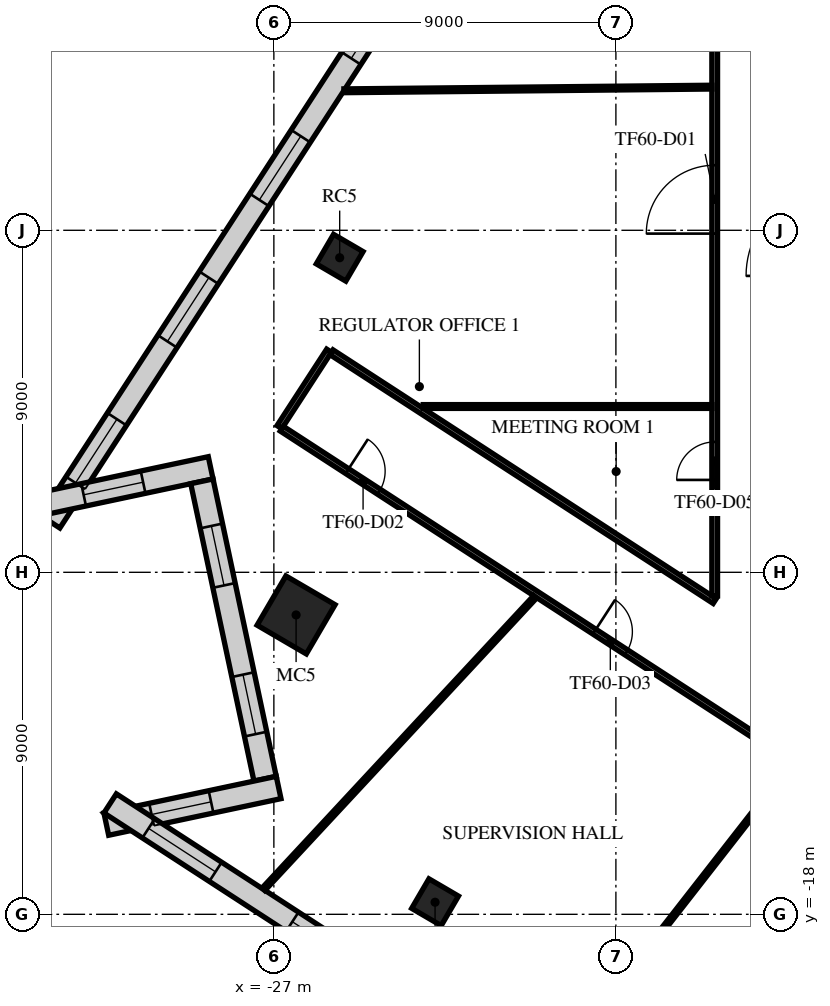
"""IFC4 building model, lengths in metres.
Left out: names, types, materials, properties, quantities, classifications, styles, units other than length and angle.
Written with IfcOpenShell. Run it as: python <this file> out.ifc"""

import sys

from ifc_helpers import new_model, si_unit, direction, frame, frame_2d, origin, origin_2d, place, context, subcontext, project, spatial, rectangle, extrude, element, fill, save


model = new_model("IFC4")
c1 = context("Model", 3, precision=1e-05, world=origin(), true_north=direction((0.0, 1.0)))
c2 = subcontext(c1, "Body", "Model", "MODEL_VIEW")
j1 = project(units=[si_unit("LENGTHUNIT", "METRE"), si_unit("PLANEANGLEUNIT", "RADIAN")], contexts=[c1])
p1 = place(None, origin())
s1 = spatial("IfcSite", under=j1, at=p1, CompositionType="ELEMENT")
p2 = place(p1, origin())
s2 = spatial("IfcBuilding", under=s1, at=p2, CompositionType="ELEMENT")
p3 = place(p2, frame((0.0, 0.0, 254.9)))
s3 = spatial("IfcBuildingStorey", under=s2, at=p3, CompositionType="ELEMENT", Elevation=254.9)
p4 = place(p3, frame((-25.268, -0.722, 0.0), z_axis=(0.0, 0.0, 1.0), x_axis=(0.504643651291, 0.863327739165, 0.0)))
e1 = element("IfcColumn", 1, at=p4, inside=s3, PredefinedType="COLUMN", context=c2, shape_type="SweptSolid", body=[
    extrude(rectangle(XDim=0.9, YDim=0.9, at=origin_2d()), origin(), (0.0, 0.0, 1.0), 4.0),
])
p5 = place(p3, frame((-26.415, -10.122, 0.0), z_axis=(0.0, 0.0, 1.0), x_axis=(0.504643651291, 0.863327739165, 0.0)))
e2 = element("IfcColumn", 2, at=p5, inside=s3, PredefinedType="COLUMN", context=c2, shape_type="SweptSolid", body=[
    extrude(rectangle(XDim=1.5, YDim=1.5, at=origin_2d()), origin(), (0.0, 0.0, 1.0), 4.0),
])
p6 = place(p3, frame((-22.758, -17.682, 0.0), z_axis=(0.0, 0.0, 1.0), x_axis=(0.504643651291, 0.863327739165, 0.0)))
e3 = element("IfcColumn", 3, at=p6, inside=s3, PredefinedType="COLUMN", context=c2, shape_type="SweptSolid", body=[
    extrude(rectangle(XDim=0.9, YDim=0.9, at=origin_2d()), origin(), (0.0, 0.0, 1.0), 4.0),
])
p7 = place(p3, frame((-6.281, 33.292, 0.0), z_axis=(0.0, 0.0, 1.0), x_axis=(-0.544637268583, -0.838671715077, 0.0)))
e4 = element("IfcWall", 4, at=p7, inside=s3, PredefinedType="STANDARD", context=c2, shape_type="SweptSolid", body=[
    extrude(rectangle(XDim=48.843, YDim=0.6, at=frame_2d((24.422, 0.0))), origin(), (0.0, 0.0, 1.0), 3.64),
])
p8 = place(p7, frame((1.22, 0.0, 0.9)))
e5 = element("IfcOpeningElement", 5, at=p8, cuts=e4, PredefinedType="OPENING", context=c2, shape_type="SweptSolid", body=[
    extrude(rectangle(XDim=2.0, YDim=2.1, at=frame_2d((1.0, 1.05))), frame((0.0, 0.31, 0.0), z_axis=(0.0, -1.0, 0.0), x_axis=(1.0, 0.0, 0.0)), (0.0, 0.0, 1.0), 0.62),
])
p9 = place(p7, frame((5.66, 0.0, 0.9)))
e6 = element("IfcOpeningElement", 6, at=p9, cuts=e4, PredefinedType="OPENING", context=c2, shape_type="SweptSolid", body=[
    extrude(rectangle(XDim=2.0, YDim=2.1, at=frame_2d((1.0, 1.05))), frame((0.0, 0.31, 0.0), z_axis=(0.0, -1.0, 0.0), x_axis=(1.0, 0.0, 0.0)), (0.0, 0.0, 1.0), 0.62),
])
p10 = place(p7, frame((14.541, 0.0, 0.9)))
e7 = element("IfcOpeningElement", 7, at=p10, cuts=e4, PredefinedType="OPENING", context=c2, shape_type="SweptSolid", body=[
    extrude(rectangle(XDim=2.0, YDim=2.1, at=frame_2d((1.0, 1.05))), frame((0.0, 0.31, 0.0), z_axis=(0.0, -1.0, 0.0), x_axis=(1.0, 0.0, 0.0)), (0.0, 0.0, 1.0), 0.62),
])
p11 = place(p7, frame((18.981, 0.0, 0.9)))
e8 = element("IfcOpeningElement", 8, at=p11, cuts=e4, PredefinedType="OPENING", context=c2, shape_type="SweptSolid", body=[
    extrude(rectangle(XDim=2.0, YDim=2.1, at=frame_2d((1.0, 1.05))), frame((0.0, 0.31, 0.0), z_axis=(0.0, -1.0, 0.0), x_axis=(1.0, 0.0, 0.0)), (0.0, 0.0, 1.0), 0.62),
])
p12 = place(p7, frame((23.422, 0.0, 0.9)))
e9 = element("IfcOpeningElement", 9, at=p12, cuts=e4, PredefinedType="OPENING", context=c2, shape_type="SweptSolid", body=[
    extrude(rectangle(XDim=2.0, YDim=2.1, at=frame_2d((1.0, 1.05))), frame((0.0, 0.31, 0.0), z_axis=(0.0, -1.0, 0.0), x_axis=(1.0, 0.0, 0.0)), (0.0, 0.0, 1.0), 0.62),
])
p13 = place(p7, frame((27.862, 0.0, 0.9)))
e10 = element("IfcOpeningElement", 10, at=p13, cuts=e4, PredefinedType="OPENING", context=c2, shape_type="SweptSolid", body=[
    extrude(rectangle(XDim=2.0, YDim=2.1, at=frame_2d((1.0, 1.05))), frame((0.0, 0.31, 0.0), z_axis=(0.0, -1.0, 0.0), x_axis=(1.0, 0.0, 0.0)), (0.0, 0.0, 1.0), 0.62),
])
p14 = place(p7, frame((32.302, 0.0, 0.9)))
e11 = element("IfcOpeningElement", 11, at=p14, cuts=e4, PredefinedType="OPENING", context=c2, shape_type="SweptSolid", body=[
    extrude(rectangle(XDim=2.0, YDim=2.1, at=frame_2d((1.0, 1.05))), frame((0.0, 0.31, 0.0), z_axis=(0.0, -1.0, 0.0), x_axis=(1.0, 0.0, 0.0)), (0.0, 0.0, 1.0), 0.62),
])
p15 = place(p7, frame((36.742, 0.0, 0.9)))
e12 = element("IfcOpeningElement", 12, at=p15, cuts=e4, PredefinedType="OPENING", context=c2, shape_type="SweptSolid", body=[
    extrude(rectangle(XDim=2.0, YDim=2.1, at=frame_2d((1.0, 1.05))), frame((0.0, 0.31, 0.0), z_axis=(0.0, -1.0, 0.0), x_axis=(1.0, 0.0, 0.0)), (0.0, 0.0, 1.0), 0.62),
])
p16 = place(p7, frame((41.183, 0.0, 0.9)))
e13 = element("IfcOpeningElement", 13, at=p16, cuts=e4, PredefinedType="OPENING", context=c2, shape_type="SweptSolid", body=[
    extrude(rectangle(XDim=2.0, YDim=2.1, at=frame_2d((1.0, 1.05))), frame((0.0, 0.31, 0.0), z_axis=(0.0, -1.0, 0.0), x_axis=(1.0, 0.0, 0.0)), (0.0, 0.0, 1.0), 0.62),
])
p17 = place(p7, frame((45.623, 0.0, 0.9)))
e14 = element("IfcOpeningElement", 14, at=p17, cuts=e4, PredefinedType="OPENING", context=c2, shape_type="SweptSolid", body=[
    extrude(rectangle(XDim=2.0, YDim=2.1, at=frame_2d((1.0, 1.05))), frame((0.0, 0.31, 0.0), z_axis=(0.0, -1.0, 0.0), x_axis=(1.0, 0.0, 0.0)), (0.0, 0.0, 1.0), 0.62),
])
p18 = place(p3, frame((-33.197, -7.215, 0.0), z_axis=(0.0, 0.0, 1.0), x_axis=(0.978143321118, 0.207931823809, 0.0)))
e15 = element("IfcWall", 15, at=p18, inside=s3, PredefinedType="STANDARD", context=c2, shape_type="SweptSolid", body=[
    extrude(rectangle(XDim=4.635, YDim=0.6, at=frame_2d((2.318, 0.0))), origin(), (0.0, 0.0, 1.0), 3.64),
])
p19 = place(p18, frame((1.218, 0.0, 0.9)))
e16 = element("IfcOpeningElement", 16, at=p19, cuts=e15, PredefinedType="OPENING", context=c2, shape_type="SweptSolid", body=[
    extrude(rectangle(XDim=1.6, YDim=2.1, at=frame_2d((0.8, 1.05))), frame((0.0, 0.31, 0.0), z_axis=(0.0, -1.0, 0.0), x_axis=(1.0, 0.0, 0.0)), (0.0, 0.0, 1.0), 0.62),
])
p20 = place(p3, frame((-28.894, -6.606, 0.0), z_axis=(0.0, 0.0, 1.0), x_axis=(0.207886494942, -0.978152955943, 0.0)))
e17 = element("IfcWall", 17, at=p20, inside=s3, PredefinedType="STANDARD", context=c2, shape_type="SweptSolid", body=[
    extrude(rectangle(XDim=8.0, YDim=0.6, at=frame_2d((4.0, 0.0))), origin(), (0.0, 0.0, 1.0), 3.64),
])
p21 = place(p20, frame((1.2, 0.0, 0.9)))
e18 = element("IfcOpeningElement", 18, at=p21, cuts=e17, PredefinedType="OPENING", context=c2, shape_type="SweptSolid", body=[
    extrude(rectangle(XDim=1.6, YDim=2.1, at=frame_2d((0.8, 1.05))), frame((0.0, 0.31, 0.0), z_axis=(0.0, -1.0, 0.0), x_axis=(1.0, 0.0, 0.0)), (0.0, 0.0, 1.0), 0.62),
])
p22 = place(p20, frame((5.2, 0.0, 0.9)))
e19 = element("IfcOpeningElement", 19, at=p22, cuts=e17, PredefinedType="OPENING", context=c2, shape_type="SweptSolid", body=[
    extrude(rectangle(XDim=1.6, YDim=2.1, at=frame_2d((0.8, 1.05))), frame((0.0, 0.31, 0.0), z_axis=(0.0, -1.0, 0.0), x_axis=(1.0, 0.0, 0.0)), (0.0, 0.0, 1.0), 0.62),
])
p23 = place(p3, frame((-26.875, -14.663, 0.0), z_axis=(0.0, 0.0, 1.0), x_axis=(-0.978145598061, -0.207921112429, 0.0)))
e20 = element("IfcWall", 20, at=p23, inside=s3, PredefinedType="STANDARD", context=c2, shape_type="SweptSolid", body=[
    extrude(rectangle(XDim=4.636, YDim=0.6, at=frame_2d((2.318, 0.0))), origin(), (0.0, 0.0, 1.0), 3.64),
])
p24 = place(p23, frame((1.818, 0.0, 0.9)))
e21 = element("IfcOpeningElement", 21, at=p24, cuts=e20, PredefinedType="OPENING", context=c2, shape_type="SweptSolid", body=[
    extrude(rectangle(XDim=1.6, YDim=2.1, at=frame_2d((0.8, 1.05))), frame((0.0, 0.31, 0.0), z_axis=(0.0, -1.0, 0.0), x_axis=(1.0, 0.0, 0.0)), (0.0, 0.0, 1.0), 0.62),
])
p25 = place(p3, frame((-31.308, -15.082, 0.0), z_axis=(0.0, 0.0, 1.0), x_axis=(0.838671071298, -0.54463825992, 0.0)))
e22 = element("IfcWall", 22, at=p25, inside=s3, PredefinedType="STANDARD", context=c2, shape_type="SweptSolid", body=[
    extrude(rectangle(XDim=36.086, YDim=0.6, at=frame_2d((18.043, 0.0))), origin(), (0.0, 0.0, 1.0), 3.64),
])
p26 = place(p25, frame((1.205, 0.0, 0.9)))
e23 = element("IfcOpeningElement", 23, at=p26, cuts=e22, PredefinedType="OPENING", context=c2, shape_type="SweptSolid", body=[
    extrude(rectangle(XDim=2.1, YDim=2.1, at=frame_2d((1.05, 1.05))), frame((0.0, 0.31, 0.0), z_axis=(0.0, -1.0, 0.0), x_axis=(1.0, 0.0, 0.0)), (0.0, 0.0, 1.0), 0.62),
])
p27 = place(p25, frame((5.716, 0.0, 0.9)))
e24 = element("IfcOpeningElement", 24, at=p27, cuts=e22, PredefinedType="OPENING", context=c2, shape_type="SweptSolid", body=[
    extrude(rectangle(XDim=2.1, YDim=2.1, at=frame_2d((1.05, 1.05))), frame((0.0, 0.31, 0.0), z_axis=(0.0, -1.0, 0.0), x_axis=(1.0, 0.0, 0.0)), (0.0, 0.0, 1.0), 0.62),
])
p28 = place(p25, frame((10.227, 0.0, 0.9)))
e25 = element("IfcOpeningElement", 25, at=p28, cuts=e22, PredefinedType="OPENING", context=c2, shape_type="SweptSolid", body=[
    extrude(rectangle(XDim=2.1, YDim=2.1, at=frame_2d((1.05, 1.05))), frame((0.0, 0.31, 0.0), z_axis=(0.0, -1.0, 0.0), x_axis=(1.0, 0.0, 0.0)), (0.0, 0.0, 1.0), 0.62),
])
p29 = place(p25, frame((14.738, 0.0, 0.9)))
e26 = element("IfcOpeningElement", 26, at=p29, cuts=e22, PredefinedType="OPENING", context=c2, shape_type="SweptSolid", body=[
    extrude(rectangle(XDim=2.1, YDim=2.1, at=frame_2d((1.05, 1.05))), frame((0.0, 0.31, 0.0), z_axis=(0.0, -1.0, 0.0), x_axis=(1.0, 0.0, 0.0)), (0.0, 0.0, 1.0), 0.62),
])
p30 = place(p25, frame((19.249, 0.0, 0.9)))
e27 = element("IfcOpeningElement", 27, at=p30, cuts=e22, PredefinedType="OPENING", context=c2, shape_type="SweptSolid", body=[
    extrude(rectangle(XDim=2.1, YDim=2.1, at=frame_2d((1.05, 1.05))), frame((0.0, 0.31, 0.0), z_axis=(0.0, -1.0, 0.0), x_axis=(1.0, 0.0, 0.0)), (0.0, 0.0, 1.0), 0.62),
])
p31 = place(p25, frame((23.759, 0.0, 0.9)))
e28 = element("IfcOpeningElement", 28, at=p31, cuts=e22, PredefinedType="OPENING", context=c2, shape_type="SweptSolid", body=[
    extrude(rectangle(XDim=2.1, YDim=2.1, at=frame_2d((1.05, 1.05))), frame((0.0, 0.31, 0.0), z_axis=(0.0, -1.0, 0.0), x_axis=(1.0, 0.0, 0.0)), (0.0, 0.0, 1.0), 0.62),
])
p32 = place(p25, frame((28.27, 0.0, 0.9)))
e29 = element("IfcOpeningElement", 29, at=p32, cuts=e22, PredefinedType="OPENING", context=c2, shape_type="SweptSolid", body=[
    extrude(rectangle(XDim=2.1, YDim=2.1, at=frame_2d((1.05, 1.05))), frame((0.0, 0.31, 0.0), z_axis=(0.0, -1.0, 0.0), x_axis=(1.0, 0.0, 0.0)), (0.0, 0.0, 1.0), 0.62),
])
p33 = place(p25, frame((32.781, 0.0, 0.9)))
e30 = element("IfcOpeningElement", 30, at=p33, cuts=e22, PredefinedType="OPENING", context=c2, shape_type="SweptSolid", body=[
    extrude(rectangle(XDim=2.1, YDim=2.1, at=frame_2d((1.05, 1.05))), frame((0.0, 0.31, 0.0), z_axis=(0.0, -1.0, 0.0), x_axis=(1.0, 0.0, 0.0)), (0.0, 0.0, 1.0), 0.62),
])
p34 = place(p3, frame((-26.854, -5.18, 0.0), z_axis=(0.0, 0.0, 1.0), x_axis=(0.544727214821, 0.838613296719, 0.0)))
e31 = element("IfcWall", 31, at=p34, inside=s3, PredefinedType="PARTITIONING", context=c2, shape_type="SweptSolid", body=[
    extrude(rectangle(XDim=2.399, YDim=0.15, at=frame_2d((1.2, 0.0))), origin(), (0.0, 0.0, 1.0), 3.04),
])
p35 = place(p3, frame((-26.791, -5.221, 0.0), z_axis=(0.0, 0.0, 1.0), x_axis=(0.838671905754, -0.544636974965, 0.0)))
e32 = element("IfcWall", 32, at=p35, inside=s3, PredefinedType="PARTITIONING", context=c2, shape_type="SweptSolid", body=[
    extrude(rectangle(XDim=39.325, YDim=0.15, at=frame_2d((19.663, 0.0))), origin(), (0.0, 0.0, 1.0), 3.04),
])
p36 = place(p35, frame((2.05, 0.0, 0.0)))
e33 = element("IfcOpeningElement", 33, at=p36, cuts=e32, PredefinedType="OPENING", context=c2, shape_type="SweptSolid", body=[
    extrude(rectangle(XDim=1.0, YDim=2.1, at=frame_2d((0.5, 1.05))), frame((0.0, 0.085, 0.0), z_axis=(0.0, -1.0, 0.0), x_axis=(1.0, 0.0, 0.0)), (0.0, 0.0, 1.0), 0.17),
])
p37 = place(p35, frame((9.807, 0.0, 0.0)))
e34 = element("IfcOpeningElement", 34, at=p37, cuts=e32, PredefinedType="OPENING", context=c2, shape_type="SweptSolid", body=[
    extrude(rectangle(XDim=1.0, YDim=2.1, at=frame_2d((0.5, 1.05))), frame((0.0, 0.085, 0.0), z_axis=(0.0, -1.0, 0.0), x_axis=(1.0, 0.0, 0.0)), (0.0, 0.0, 1.0), 0.17),
])
p38 = place(p35, frame((18.866, 0.0, 0.0)))
e35 = element("IfcOpeningElement", 35, at=p38, cuts=e32, PredefinedType="OPENING", context=c2, shape_type="SweptSolid", body=[
    extrude(rectangle(XDim=1.0, YDim=2.1, at=frame_2d((0.5, 1.05))), frame((0.0, 0.085, 0.0), z_axis=(0.0, -1.0, 0.0), x_axis=(1.0, 0.0, 0.0)), (0.0, 0.0, 1.0), 0.17),
])
p39 = place(p35, frame((25.009, 0.0, 0.0)))
e36 = element("IfcOpeningElement", 36, at=p39, cuts=e32, PredefinedType="OPENING", context=c2, shape_type="SweptSolid", body=[
    extrude(rectangle(XDim=1.0, YDim=2.1, at=frame_2d((0.5, 1.05))), frame((0.0, 0.085, 0.0), z_axis=(0.0, -1.0, 0.0), x_axis=(1.0, 0.0, 0.0)), (0.0, 0.0, 1.0), 0.17),
])
p40 = place(p35, frame((36.069, 0.0, 0.0)))
e37 = element("IfcOpeningElement", 37, at=p40, cuts=e32, PredefinedType="OPENING", context=c2, shape_type="SweptSolid", body=[
    extrude(rectangle(XDim=1.8, YDim=2.1, at=frame_2d((0.9, 1.05))), frame((0.0, 0.085, 0.0), z_axis=(0.0, -1.0, 0.0), x_axis=(1.0, 0.0, 0.0)), (0.0, 0.0, 1.0), 0.17),
])
p41 = place(p3, frame((-25.484, -3.209, 0.0), z_axis=(0.0, 0.0, 1.0), x_axis=(0.838696356723, -0.544599321721, 0.0)))
e38 = element("IfcWall", 38, at=p41, inside=s3, PredefinedType="PARTITIONING", context=c2, shape_type="SweptSolid", body=[
    extrude(rectangle(XDim=12.024, YDim=0.15, at=frame_2d((6.012, 0.0))), origin(), (0.0, 0.0, 1.0), 3.04),
])
p42 = place(p3, frame((-15.4, -9.619, 0.0), z_axis=(0.0, 0.0, 1.0), x_axis=(0.0, 1.0, 0.0)))
e39 = element("IfcWall", 39, at=p42, inside=s3, PredefinedType="PARTITIONING", context=c2, shape_type="SweptSolid", body=[
    extrude(rectangle(XDim=25.019, YDim=0.15, at=frame_2d((12.509, 0.0))), origin(), (0.0, 0.0, 1.0), 3.24),
])
p43 = place(p42, frame((9.532, 0.0, 0.0)))
e40 = element("IfcOpeningElement", 40, at=p43, cuts=e39, PredefinedType="OPENING", context=c2, shape_type="SweptSolid", body=[
    extrude(rectangle(XDim=1.8, YDim=2.1, at=frame_2d((0.9, 1.05))), frame((0.0, 0.085, 0.0), z_axis=(0.0, -1.0, 0.0), x_axis=(1.0, 0.0, 0.0)), (0.0, 0.0, 1.0), 0.17),
])
p44 = place(p42, frame((16.437, 0.0, 0.0)))
e41 = element("IfcOpeningElement", 41, at=p44, cuts=e39, PredefinedType="OPENING", context=c2, shape_type="SweptSolid", body=[
    extrude(rectangle(XDim=1.0, YDim=2.1, at=frame_2d((0.5, 1.05))), frame((0.0, 0.085, 0.0), z_axis=(0.0, -1.0, 0.0), x_axis=(1.0, 0.0, 0.0)), (0.0, 0.0, 1.0), 0.17),
])
p45 = place(p42, frame((3.05, 0.0, 0.0)))
e42 = element("IfcOpeningElement", 42, at=p45, cuts=e39, PredefinedType="OPENING", context=c2, shape_type="SweptSolid", body=[
    extrude(rectangle(XDim=1.0, YDim=2.1, at=frame_2d((0.5, 1.05))), frame((0.0, 0.085, 0.0), z_axis=(0.0, -1.0, 0.0), x_axis=(1.0, 0.0, 0.0)), (0.0, 0.0, 1.0), 0.17),
])
p46 = place(p3, frame((-27.274, -17.341, 0.0), z_axis=(0.0, 0.0, 1.0), x_axis=(0.680597347882, 0.732657662252, 0.0)))
e43 = element("IfcWall", 43, at=p46, inside=s3, PredefinedType="PARTITIONING", context=c2, shape_type="SweptSolid", body=[
    extrude(rectangle(XDim=10.5, YDim=0.1, at=frame_2d((5.25, 0.0))), origin(), (0.0, 0.0, 1.0), 3.04),
])
p47 = place(p3, frame((-25.157, 3.671, 0.0), z_axis=(0.0, 0.0, 1.0), x_axis=(0.999950644633, 0.009935204993, 0.0)))
e44 = element("IfcWall", 44, at=p47, inside=s3, PredefinedType="PARTITIONING", context=c2, shape_type="SweptSolid", body=[
    extrude(rectangle(XDim=9.682, YDim=0.1, at=frame_2d((4.841, 0.0))), origin(), (0.0, 0.0, 1.0), 3.04),
])
p48 = place(p3, frame((-23.069, -4.637, 0.0), z_axis=(0.0, 0.0, 1.0), x_axis=(1.0, 0.0, 0.0)))
e45 = element("IfcWall", 45, at=p48, inside=s3, PredefinedType="PARTITIONING", context=c2, shape_type="SweptSolid", body=[
    extrude(rectangle(XDim=7.594, YDim=0.1, at=frame_2d((3.797, 0.0))), origin(), (0.0, 0.0, 1.0), 3.64),
])
p49 = place(p3, frame((-19.751, -22.226, 0.0), z_axis=(0.0, 0.0, 1.0), x_axis=(0.615010755177, 0.788518719509, 0.0)))
e46 = element("IfcWall", 46, at=p49, inside=s3, PredefinedType="PARTITIONING", context=c2, shape_type="SweptSolid", body=[
    extrude(rectangle(XDim=10.387, YDim=0.1, at=frame_2d((5.194, 0.0))), origin(), (0.0, 0.0, 1.0), 3.04),
])
p50 = place(p14, origin())
e47 = element("IfcWindow", 47, at=p50, inside=s3, PartitioningType="SINGLE_PANEL", PredefinedType="WINDOW", context=c2, shape_type="SweptSolid", body=[
    extrude(rectangle(XDim=2.0, YDim=2.1, at=frame_2d((1.0, 1.05))), frame((0.0, 0.03, 0.0), z_axis=(0.0, -1.0, 0.0), x_axis=(1.0, 0.0, 0.0)), (0.0, 0.0, 1.0), 0.06),
])
fill(e11, e47)
p51 = place(p15, origin())
e48 = element("IfcWindow", 48, at=p51, inside=s3, PartitioningType="SINGLE_PANEL", PredefinedType="WINDOW", context=c2, shape_type="SweptSolid", body=[
    extrude(rectangle(XDim=2.0, YDim=2.1, at=frame_2d((1.0, 1.05))), frame((0.0, 0.03, 0.0), z_axis=(0.0, -1.0, 0.0), x_axis=(1.0, 0.0, 0.0)), (0.0, 0.0, 1.0), 0.06),
])
fill(e12, e48)
p52 = place(p16, origin())
e49 = element("IfcWindow", 49, at=p52, inside=s3, PartitioningType="SINGLE_PANEL", PredefinedType="WINDOW", context=c2, shape_type="SweptSolid", body=[
    extrude(rectangle(XDim=2.0, YDim=2.1, at=frame_2d((1.0, 1.05))), frame((0.0, 0.03, 0.0), z_axis=(0.0, -1.0, 0.0), x_axis=(1.0, 0.0, 0.0)), (0.0, 0.0, 1.0), 0.06),
])
fill(e13, e49)
p53 = place(p17, origin())
e50 = element("IfcWindow", 50, at=p53, inside=s3, PartitioningType="SINGLE_PANEL", PredefinedType="WINDOW", context=c2, shape_type="SweptSolid", body=[
    extrude(rectangle(XDim=2.0, YDim=2.1, at=frame_2d((1.0, 1.05))), frame((0.0, 0.03, 0.0), z_axis=(0.0, -1.0, 0.0), x_axis=(1.0, 0.0, 0.0)), (0.0, 0.0, 1.0), 0.06),
])
fill(e14, e50)
p54 = place(p19, origin())
e51 = element("IfcWindow", 51, at=p54, inside=s3, PartitioningType="SINGLE_PANEL", PredefinedType="WINDOW", context=c2, shape_type="SweptSolid", body=[
    extrude(rectangle(XDim=1.6, YDim=2.1, at=frame_2d((0.8, 1.05))), frame((0.0, 0.03, 0.0), z_axis=(0.0, -1.0, 0.0), x_axis=(1.0, 0.0, 0.0)), (0.0, 0.0, 1.0), 0.06),
])
fill(e16, e51)
p55 = place(p21, origin())
e52 = element("IfcWindow", 52, at=p55, inside=s3, PartitioningType="SINGLE_PANEL", PredefinedType="WINDOW", context=c2, shape_type="SweptSolid", body=[
    extrude(rectangle(XDim=1.6, YDim=2.1, at=frame_2d((0.8, 1.05))), frame((0.0, 0.03, 0.0), z_axis=(0.0, -1.0, 0.0), x_axis=(1.0, 0.0, 0.0)), (0.0, 0.0, 1.0), 0.06),
])
fill(e18, e52)
p56 = place(p22, origin())
e53 = element("IfcWindow", 53, at=p56, inside=s3, PartitioningType="SINGLE_PANEL", PredefinedType="WINDOW", context=c2, shape_type="SweptSolid", body=[
    extrude(rectangle(XDim=1.6, YDim=2.1, at=frame_2d((0.8, 1.05))), frame((0.0, 0.03, 0.0), z_axis=(0.0, -1.0, 0.0), x_axis=(1.0, 0.0, 0.0)), (0.0, 0.0, 1.0), 0.06),
])
fill(e19, e53)
p57 = place(p24, origin())
e54 = element("IfcWindow", 54, at=p57, inside=s3, PartitioningType="SINGLE_PANEL", PredefinedType="WINDOW", context=c2, shape_type="SweptSolid", body=[
    extrude(rectangle(XDim=1.6, YDim=2.1, at=frame_2d((0.8, 1.05))), frame((0.0, 0.03, 0.0), z_axis=(0.0, -1.0, 0.0), x_axis=(1.0, 0.0, 0.0)), (0.0, 0.0, 1.0), 0.06),
])
fill(e21, e54)
p58 = place(p26, origin())
e55 = element("IfcWindow", 55, at=p58, inside=s3, PartitioningType="SINGLE_PANEL", PredefinedType="WINDOW", context=c2, shape_type="SweptSolid", body=[
    extrude(rectangle(XDim=2.1, YDim=2.1, at=frame_2d((1.05, 1.05))), frame((0.0, 0.03, 0.0), z_axis=(0.0, -1.0, 0.0), x_axis=(1.0, 0.0, 0.0)), (0.0, 0.0, 1.0), 0.06),
])
fill(e23, e55)
p59 = place(p27, origin())
e56 = element("IfcWindow", 56, at=p59, inside=s3, PartitioningType="SINGLE_PANEL", PredefinedType="WINDOW", context=c2, shape_type="SweptSolid", body=[
    extrude(rectangle(XDim=2.1, YDim=2.1, at=frame_2d((1.05, 1.05))), frame((0.0, 0.03, 0.0), z_axis=(0.0, -1.0, 0.0), x_axis=(1.0, 0.0, 0.0)), (0.0, 0.0, 1.0), 0.06),
])
fill(e24, e56)
p60 = place(p43, origin())
e57 = element("IfcDoor", 57, at=p60, inside=s3, OperationType="DOUBLE_DOOR_SINGLE_SWING", PredefinedType="DOOR", context=c2, shape_type="SweptSolid", body=[
    extrude(rectangle(XDim=1.8, YDim=2.1, at=frame_2d((0.9, 1.05))), frame((0.0, 0.025, 0.0), z_axis=(0.0, -1.0, 0.0), x_axis=(1.0, 0.0, 0.0)), (0.0, 0.0, 1.0), 0.05),
])
fill(e40, e57)
p61 = place(p36, frame((1.0, 0.0, 0.0), z_axis=(0.0, 0.0, 1.0), x_axis=(-1.0, 0.0, 0.0)))
e58 = element("IfcDoor", 58, at=p61, inside=s3, OperationType="SINGLE_SWING_LEFT", PredefinedType="DOOR", context=c2, shape_type="SweptSolid", body=[
    extrude(rectangle(XDim=1.0, YDim=2.1, at=frame_2d((0.5, 1.05))), frame((0.0, 0.025, 0.0), z_axis=(0.0, -1.0, 0.0), x_axis=(1.0, 0.0, 0.0)), (0.0, 0.0, 1.0), 0.05),
])
fill(e33, e58)
p62 = place(p37, frame((1.0, 0.0, 0.0), z_axis=(0.0, 0.0, 1.0), x_axis=(-1.0, 0.0, 0.0)))
e59 = element("IfcDoor", 59, at=p62, inside=s3, OperationType="SINGLE_SWING_LEFT", PredefinedType="DOOR", context=c2, shape_type="SweptSolid", body=[
    extrude(rectangle(XDim=1.0, YDim=2.1, at=frame_2d((0.5, 1.05))), frame((0.0, 0.025, 0.0), z_axis=(0.0, -1.0, 0.0), x_axis=(1.0, 0.0, 0.0)), (0.0, 0.0, 1.0), 0.05),
])
fill(e34, e59)
p63 = place(p45, origin())
e60 = element("IfcDoor", 60, at=p63, inside=s3, OperationType="SINGLE_SWING_LEFT", PredefinedType="DOOR", context=c2, shape_type="SweptSolid", body=[
    extrude(rectangle(XDim=1.0, YDim=2.1, at=frame_2d((0.5, 1.05))), frame((0.0, 0.025, 0.0), z_axis=(0.0, -1.0, 0.0), x_axis=(1.0, 0.0, 0.0)), (0.0, 0.0, 1.0), 0.05),
])
fill(e42, e60)
save(model, sys.argv[1])
